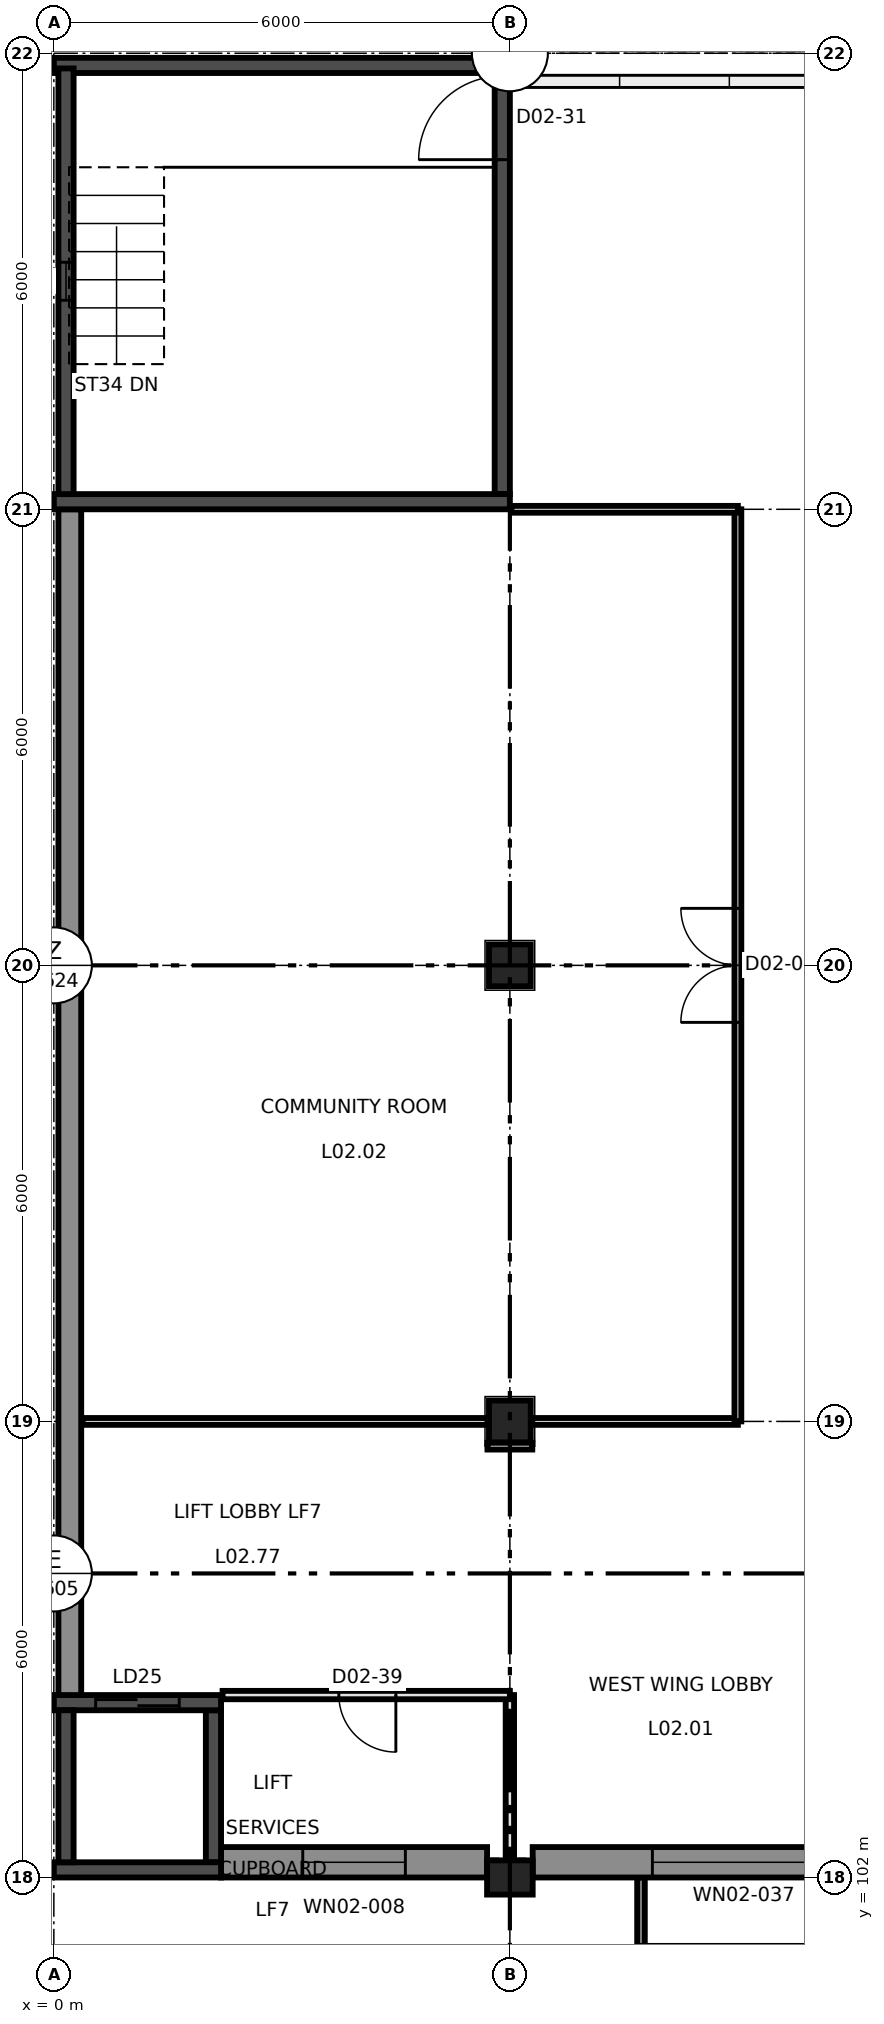
"""IFC4 building model, lengths in metres.
Left out: names, types, materials, properties, quantities, classifications, styles, units other than length and angle.
Written with IfcOpenShell. Run it as: python <this file> out.ifc"""

import sys

from ifc_helpers import new_model, si_unit, direction, frame, frame_2d, origin, origin_2d, place, context, subcontext, project, spatial, rectangle, extrude, element, fill, save


model = new_model("IFC4")
c1 = context("Model", 3, precision=1e-05, world=origin(), true_north=direction((0.0, 1.0)))
c2 = subcontext(c1, "Body", "Model", "MODEL_VIEW")
j1 = project(units=[si_unit("LENGTHUNIT", "METRE"), si_unit("PLANEANGLEUNIT", "RADIAN")], contexts=[c1])
p1 = place(None, origin())
s1 = spatial("IfcSite", under=j1, at=p1, CompositionType="ELEMENT")
p2 = place(p1, origin())
s2 = spatial("IfcBuilding", under=s1, at=p2, CompositionType="ELEMENT")
p3 = place(p2, frame((0.0, 0.0, 12.0)))
s3 = spatial("IfcBuildingStorey", under=s2, at=p3, CompositionType="ELEMENT", Elevation=12.0)
p4 = place(p3, frame((6.0, 102.0, 0.0), z_axis=(0.0, 0.0, 1.0), x_axis=(1.0, 0.0, 0.0)))
e1 = element("IfcColumn", 1, at=p4, inside=s3, PredefinedType="COLUMN", context=c2, shape_type="SweptSolid", body=[
    extrude(rectangle(XDim=0.6, YDim=0.45, at=origin_2d()), origin(), (0.0, 0.0, 1.0), 4.25),
])
for number, where, z_axis, x_axis in (
    (2, (6.0, 108.0, 0.0), (0.0, 0.0, 1.0), (1.0, 0.0, 0.0)),
    (3, (6.0, 114.0, 0.0), (0.0, 0.0, 1.0), (1.0, 0.0, 0.0)),
):
    element("IfcColumn", number, at=place(p3, frame(where, z_axis=z_axis, x_axis=x_axis)), inside=s3, PredefinedType="COLUMN", context=c2, shape_type="SweptSolid", body=[
        extrude(rectangle(XDim=0.55, YDim=0.55, at=origin_2d()), origin(), (0.0, 0.0, 1.0), 4.25),
    ])
for number, where, z_axis, x_axis in (
    (4, (0.0, 125.84, 0.0), (0.0, 0.0, 1.0), (1.0, 0.0, 0.0)),
    (5, (0.0, 120.1, 0.0), (0.0, 0.0, 1.0), (1.0, 0.0, 0.0)),
):
    element("IfcWall", number, at=place(p3, frame(where, z_axis=z_axis, x_axis=x_axis)), inside=s3, PredefinedType="SHEAR", context=c2, shape_type="SweptSolid", body=[
        extrude(rectangle(XDim=6.0, YDim=0.2, at=frame_2d((3.0, 0.0))), origin(), (0.0, 0.0, 1.0), 4.25),
    ])
p5 = place(p3, frame((0.16, 120.2, 0.0), z_axis=(0.0, 0.0, 1.0), x_axis=(0.0, 1.0, 0.0)))
e6 = element("IfcWall", 6, at=p5, inside=s3, PredefinedType="SHEAR", context=c2, shape_type="SweptSolid", body=[
    extrude(rectangle(XDim=5.6, YDim=0.2, at=frame_2d((2.8, 0.0))), origin(), (0.0, 0.0, 1.0), 4.25),
])
p6 = place(p5, frame((2.55, 0.0, 0.9)))
e7 = element("IfcOpeningElement", 7, at=p6, cuts=e6, PredefinedType="OPENING", context=c2, shape_type="SweptSolid", body=[
    extrude(rectangle(XDim=0.5, YDim=2.1, at=frame_2d((0.25, 1.05))), frame((0.0, 0.11, 0.0), z_axis=(0.0, -1.0, 0.0), x_axis=(1.0, 0.0, 0.0)), (0.0, 0.0, 1.0), 0.22),
])
p7 = place(p3, frame((5.9, 120.2, 0.0), z_axis=(0.0, 0.0, 1.0), x_axis=(0.0, 1.0, 0.0)))
e8 = element("IfcWall", 8, at=p7, inside=s3, PredefinedType="SHEAR", context=c2, shape_type="SweptSolid", body=[
    extrude(rectangle(XDim=5.6, YDim=0.2, at=frame_2d((2.8, 0.0))), origin(), (0.0, 0.0, 1.0), 4.25),
])
p8 = place(p7, frame((4.4, 0.0, 0.0)))
e9 = element("IfcOpeningElement", 9, at=p8, cuts=e8, PredefinedType="OPENING", context=c2, shape_type="SweptSolid", body=[
    extrude(rectangle(XDim=1.1, YDim=2.2, at=frame_2d((0.55, 1.1))), frame((0.0, 0.11, 0.0), z_axis=(0.0, -1.0, 0.0), x_axis=(1.0, 0.0, 0.0)), (0.0, 0.0, 1.0), 0.22),
])
p9 = place(p3, frame((0.0, 104.3, 0.0), z_axis=(0.0, 0.0, 1.0), x_axis=(1.0, 0.0, 0.0)))
e10 = element("IfcWall", 10, at=p9, inside=s3, PredefinedType="SHEAR", context=c2, shape_type="SweptSolid", body=[
    extrude(rectangle(XDim=2.2, YDim=0.2, at=frame_2d((1.1, 0.0))), origin(), (0.0, 0.0, 1.0), 4.25),
])
p10 = place(p9, frame((0.55, 0.0, 0.0)))
e11 = element("IfcOpeningElement", 11, at=p10, cuts=e10, PredefinedType="OPENING", context=c2, shape_type="SweptSolid", body=[
    extrude(rectangle(XDim=1.1, YDim=2.1, at=frame_2d((0.55, 1.05))), frame((0.0, 0.11, 0.0), z_axis=(0.0, -1.0, 0.0), x_axis=(1.0, 0.0, 0.0)), (0.0, 0.0, 1.0), 0.22),
])
p11 = place(p3, frame((0.0, 102.1, 0.0), z_axis=(0.0, 0.0, 1.0), x_axis=(1.0, 0.0, 0.0)))
e12 = element("IfcWall", 12, at=p11, inside=s3, PredefinedType="SHEAR", context=c2, shape_type="SweptSolid", body=[
    extrude(rectangle(XDim=2.2, YDim=0.2, at=frame_2d((1.1, 0.0))), origin(), (0.0, 0.0, 1.0), 4.25),
])
for number, where, z_axis, x_axis in (
    (13, (0.16, 102.2, 0.0), (0.0, 0.0, 1.0), (0.0, 1.0, 0.0)),
    (14, (2.1, 102.2, 0.0), (0.0, 0.0, 1.0), (0.0, 1.0, 0.0)),
):
    element("IfcWall", number, at=place(p3, frame(where, z_axis=z_axis, x_axis=x_axis)), inside=s3, PredefinedType="SHEAR", context=c2, shape_type="SweptSolid", body=[
        extrude(rectangle(XDim=2.0, YDim=0.2, at=frame_2d((1.0, 0.0))), origin(), (0.0, 0.0, 1.0), 4.25),
    ])
p12 = place(p3, frame((0.21, 104.4, 0.0), z_axis=(0.0, 0.0, 1.0), x_axis=(0.0, 1.0, 0.0)))
e15 = element("IfcWall", 15, at=p12, inside=s3, PredefinedType="SOLIDWALL", context=c2, shape_type="SweptSolid", body=[
    extrude(rectangle(XDim=15.6, YDim=0.3, at=frame_2d((7.8, 0.0))), origin(), (0.0, 0.0, 1.0), 4.5),
])
p13 = place(p3, frame((11.85, 102.2, 0.0), z_axis=(0.0, 0.0, 1.0), x_axis=(-1.0, 0.0, 0.0)))
e16 = element("IfcWall", 16, at=p13, inside=s3, PredefinedType="SOLIDWALL", context=c2, shape_type="SweptSolid", body=[
    extrude(rectangle(XDim=5.55, YDim=0.4, at=frame_2d((2.775, 0.0))), origin(), (0.0, 0.0, 1.0), 3.8),
])
p14 = place(p13, frame((1.575, 0.0, 0.9)))
e17 = element("IfcOpeningElement", 17, at=p14, cuts=e16, PredefinedType="OPENING", context=c2, shape_type="SweptSolid", body=[
    extrude(rectangle(XDim=2.4, YDim=2.45, at=frame_2d((1.2, 1.225))), frame((0.0, 0.21, 0.0), z_axis=(0.0, -1.0, 0.0), x_axis=(1.0, 0.0, 0.0)), (0.0, 0.0, 1.0), 0.42),
])
p15 = place(p3, frame((5.7, 102.2, 0.0), z_axis=(0.0, 0.0, 1.0), x_axis=(-1.0, 0.0, 0.0)))
e18 = element("IfcWall", 18, at=p15, inside=s3, PredefinedType="SOLIDWALL", context=c2, shape_type="SweptSolid", body=[
    extrude(rectangle(XDim=3.5, YDim=0.4, at=frame_2d((1.75, 0.0))), origin(), (0.0, 0.0, 1.0), 4.25),
])
p16 = place(p15, frame((1.075, 0.0, 0.9)))
e19 = element("IfcOpeningElement", 19, at=p16, cuts=e18, PredefinedType="OPENING", context=c2, shape_type="SweptSolid", body=[
    extrude(rectangle(XDim=1.35, YDim=2.45, at=frame_2d((0.675, 1.225))), frame((0.0, 0.21, 0.0), z_axis=(0.0, -1.0, 0.0), x_axis=(1.0, 0.0, 0.0)), (0.0, 0.0, 1.0), 0.42),
])
p17 = place(p3, frame((7.725, 102.0, 0.0), z_axis=(0.0, 0.0, 1.0), x_axis=(0.0, -1.0, 0.0)))
e20 = element("IfcWall", 20, at=p17, inside=s3, PredefinedType="SOLIDWALL", context=c2, shape_type="SweptSolid", body=[
    extrude(rectangle(XDim=0.9, YDim=0.1, at=frame_2d((0.45, 0.0))), origin(), (0.0, 0.0, 1.0), 3.5),
])
p18 = place(p3, frame((6.0, 102.245, 0.0), z_axis=(0.0, 0.0, 1.0), x_axis=(0.0, 1.0, 0.0)))
e21 = element("IfcWall", 21, at=p18, inside=s3, PredefinedType="PARTITIONING", context=c2, shape_type="SweptSolid", body=[
    extrude(rectangle(XDim=2.155, YDim=0.11, at=frame_2d((1.077, 0.0))), origin(), (0.0, 0.0, 1.0), 3.75),
])
p19 = place(p3, frame((2.22, 104.4, 0.0), z_axis=(0.0, 0.0, 1.0), x_axis=(1.0, 0.0, 0.0)))
e22 = element("IfcWall", 22, at=p19, inside=s3, PredefinedType="PARTITIONING", context=c2, shape_type="SweptSolid", body=[
    extrude(rectangle(XDim=3.78, YDim=0.11, at=frame_2d((1.89, 0.0))), origin(), (0.0, 0.0, 1.0), 3.75),
])
p20 = place(p19, frame((1.53, 0.0, 0.0)))
e23 = element("IfcOpeningElement", 23, at=p20, cuts=e22, PredefinedType="OPENING", context=c2, shape_type="SweptSolid", body=[
    extrude(rectangle(XDim=0.75, YDim=2.04, at=frame_2d((0.375, 1.02))), frame((0.0, 0.065, 0.0), z_axis=(0.0, -1.0, 0.0), x_axis=(1.0, 0.0, 0.0)), (0.0, 0.0, 1.0), 0.13),
])
p21 = place(p3, frame((0.38, 108.0, 0.0), z_axis=(0.0, 0.0, 1.0), x_axis=(1.0, 0.0, 0.0)))
e24 = element("IfcWall", 24, at=p21, inside=s3, PredefinedType="PARTITIONING", context=c2, shape_type="SweptSolid", body=[
    extrude(rectangle(XDim=5.325, YDim=0.09, at=frame_2d((2.663, 0.0))), origin(), (0.0, 0.0, 1.0), 4.28),
])
p22 = place(p3, frame((6.295, 108.0, 0.0), z_axis=(0.0, 0.0, 1.0), x_axis=(1.0, 0.0, 0.0)))
e25 = element("IfcWall", 25, at=p22, inside=s3, PredefinedType="PARTITIONING", context=c2, shape_type="SweptSolid", body=[
    extrude(rectangle(XDim=2.705, YDim=0.09, at=frame_2d((1.353, 0.0))), origin(), (0.0, 0.0, 1.0), 3.75),
])
p23 = place(p3, frame((5.705, 107.675, 0.0), z_axis=(0.0, 0.0, 1.0), x_axis=(1.0, 0.0, 0.0)))
e26 = element("IfcWall", 26, at=p23, inside=s3, PredefinedType="PARTITIONING", context=c2, shape_type="SweptSolid", body=[
    extrude(rectangle(XDim=0.59, YDim=0.09, at=frame_2d((0.295, 0.0))), origin(), (0.0, 0.0, 1.0), 3.75),
])
p24 = place(p3, frame((9.0, 108.0, 0.0), z_axis=(0.0, 0.0, 1.0), x_axis=(0.0, 1.0, 0.0)))
e27 = element("IfcWall", 27, at=p24, inside=s3, PredefinedType="PARTITIONING", context=c2, shape_type="SweptSolid", body=[
    extrude(rectangle(XDim=12.0, YDim=0.09, at=frame_2d((6.0, 0.0))), origin(), (0.0, 0.0, 1.0), 3.75),
])
p25 = place(p24, frame((5.25, 0.0, 0.0)))
e28 = element("IfcOpeningElement", 28, at=p25, cuts=e27, PredefinedType="OPENING", context=c2, shape_type="SweptSolid", body=[
    extrude(rectangle(XDim=1.5, YDim=2.1, at=frame_2d((0.75, 1.05))), frame((0.0, 0.055, 0.0), z_axis=(0.0, -1.0, 0.0), x_axis=(1.0, 0.0, 0.0)), (0.0, 0.0, 1.0), 0.11),
])
p26 = place(p3, frame((6.02, 120.0, 0.0), z_axis=(0.0, 0.0, 1.0), x_axis=(1.0, 0.0, 0.0)))
e29 = element("IfcWall", 29, at=p26, inside=s3, PredefinedType="PARTITIONING", context=c2, shape_type="SweptSolid", body=[
    extrude(rectangle(XDim=2.98, YDim=0.09, at=frame_2d((1.49, 0.0))), origin(), (0.0, 0.0, 1.0), 4.28),
])
p27 = place(p16, origin())
e30 = element("IfcWindow", 30, at=p27, inside=s3, PartitioningType="SINGLE_PANEL", PredefinedType="WINDOW", context=c2, shape_type="SweptSolid", body=[
    extrude(rectangle(XDim=1.35, YDim=2.45, at=frame_2d((0.675, 1.225))), frame((0.0, 0.03, 0.0), z_axis=(0.0, -1.0, 0.0), x_axis=(1.0, 0.0, 0.0)), (0.0, 0.0, 1.0), 0.06),
])
fill(e19, e30)
p28 = place(p6, origin())
e31 = element("IfcWindow", 31, at=p28, inside=s3, PartitioningType="SINGLE_PANEL", PredefinedType="WINDOW", context=c2, shape_type="SweptSolid", body=[
    extrude(rectangle(XDim=0.5, YDim=2.1, at=frame_2d((0.25, 1.05))), frame((0.0, 0.03, 0.0), z_axis=(0.0, -1.0, 0.0), x_axis=(1.0, 0.0, 0.0)), (0.0, 0.0, 1.0), 0.06),
])
fill(e7, e31)
p29 = place(p14, origin())
e32 = element("IfcWindow", 32, at=p29, inside=s3, PartitioningType="SINGLE_PANEL", PredefinedType="WINDOW", context=c2, shape_type="SweptSolid", body=[
    extrude(rectangle(XDim=2.4, YDim=2.45, at=frame_2d((1.2, 1.225))), frame((0.0, 0.03, 0.0), z_axis=(0.0, -1.0, 0.0), x_axis=(1.0, 0.0, 0.0)), (0.0, 0.0, 1.0), 0.06),
])
fill(e17, e32)
p30 = place(p25, frame((1.5, 0.0, 0.0), z_axis=(0.0, 0.0, 1.0), x_axis=(-1.0, 0.0, 0.0)))
e33 = element("IfcDoor", 33, at=p30, inside=s3, OperationType="DOUBLE_DOOR_SINGLE_SWING", PredefinedType="DOOR", context=c2, shape_type="SweptSolid", body=[
    extrude(rectangle(XDim=1.5, YDim=2.1, at=frame_2d((0.75, 1.05))), frame((0.0, 0.025, 0.0), z_axis=(0.0, -1.0, 0.0), x_axis=(1.0, 0.0, 0.0)), (0.0, 0.0, 1.0), 0.05),
])
fill(e28, e33)
p31 = place(p8, origin())
e34 = element("IfcDoor", 34, at=p31, inside=s3, OperationType="SINGLE_SWING_LEFT", PredefinedType="DOOR", context=c2, shape_type="SweptSolid", body=[
    extrude(rectangle(XDim=1.1, YDim=2.2, at=frame_2d((0.55, 1.1))), frame((0.0, 0.025, 0.0), z_axis=(0.0, -1.0, 0.0), x_axis=(1.0, 0.0, 0.0)), (0.0, 0.0, 1.0), 0.05),
])
fill(e9, e34)
p32 = place(p20, frame((0.75, 0.0, 0.0), z_axis=(0.0, 0.0, 1.0), x_axis=(-1.0, 0.0, 0.0)))
e35 = element("IfcDoor", 35, at=p32, inside=s3, OperationType="SINGLE_SWING_RIGHT", PredefinedType="DOOR", context=c2, shape_type="SweptSolid", body=[
    extrude(rectangle(XDim=0.75, YDim=2.04, at=frame_2d((0.375, 1.02))), frame((0.0, 0.025, 0.0), z_axis=(0.0, -1.0, 0.0), x_axis=(1.0, 0.0, 0.0)), (0.0, 0.0, 1.0), 0.05),
])
fill(e23, e35)
p33 = place(p10, origin())
e36 = element("IfcDoor", 36, at=p33, inside=s3, OperationType="DOUBLE_DOOR_SLIDING", PredefinedType="DOOR", context=c2, shape_type="SweptSolid", body=[
    extrude(rectangle(XDim=1.1, YDim=2.1, at=frame_2d((0.55, 1.05))), frame((0.0, 0.025, 0.0), z_axis=(0.0, -1.0, 0.0), x_axis=(1.0, 0.0, 0.0)), (0.0, 0.0, 1.0), 0.05),
])
fill(e11, e36)
save(model, sys.argv[1])
